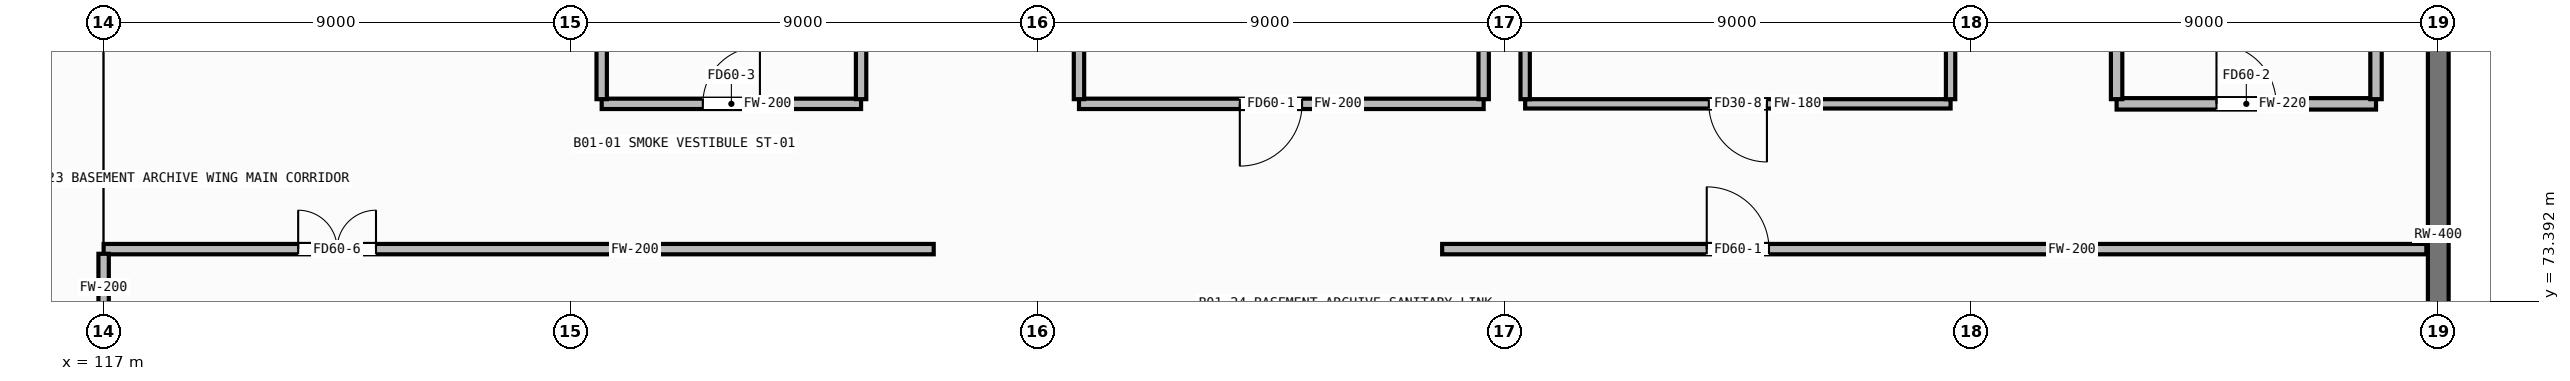
"""IFC4 building model, lengths in metres.
Left out: names, types, materials, properties, quantities, classifications, styles, units other than length and angle.
Written with IfcOpenShell. Run it as: python <this file> out.ifc"""

import sys

from ifc_helpers import new_model, si_unit, direction, frame, frame_2d, origin, place, context, subcontext, project, spatial, rectangle, extrude, element, fill, save


model = new_model("IFC4")
c1 = context("Model", 3, precision=1e-05, world=origin(), true_north=direction((0.0, 1.0)))
c2 = subcontext(c1, "Body", "Model", "MODEL_VIEW")
j1 = project(units=[si_unit("LENGTHUNIT", "METRE"), si_unit("PLANEANGLEUNIT", "RADIAN")], contexts=[c1])
p1 = place(None, origin())
s1 = spatial("IfcSite", under=j1, at=p1, CompositionType="ELEMENT")
p2 = place(p1, origin())
s2 = spatial("IfcBuilding", under=s1, at=p2, CompositionType="ELEMENT")
p3 = place(p2, frame((0.0, 0.0, -4.9)))
s3 = spatial("IfcBuildingStorey", under=s2, at=p3, CompositionType="ELEMENT", Elevation=-4.9)
p4 = place(p3, frame((162.0, 78.85, 0.0), z_axis=(0.0, 0.0, 1.0), x_axis=(0.0, -1.0, 0.0)))
e1 = element("IfcWall", 1, at=p4, inside=s3, PredefinedType="SOLIDWALL", context=c2, shape_type="SweptSolid", body=[
    extrude(rectangle(XDim=6.5, YDim=0.4, at=frame_2d((3.25, 0.0))), origin(), (0.0, 0.0, 1.0), 4.125),
])
p5 = place(p3, frame((126.6, 77.2, 0.0), z_axis=(0.0, 0.0, 1.0), x_axis=(1.0, 0.0, 0.0)))
e2 = element("IfcWall", 2, at=p5, inside=s3, PredefinedType="PARTITIONING", context=c2, shape_type="SweptSolid", body=[
    extrude(rectangle(XDim=5.0, YDim=0.2, at=frame_2d((2.5, 0.0))), origin(), (0.0, 0.0, 1.0), 4.625),
])
p6 = place(p5, frame((1.95, 0.0, 0.0)))
e3 = element("IfcOpeningElement", 3, at=p6, cuts=e2, PredefinedType="OPENING", context=c2, shape_type="SweptSolid", body=[
    extrude(rectangle(XDim=1.1, YDim=2.08, at=frame_2d((0.55, 1.04))), frame((0.0, 0.112, 0.0), z_axis=(0.0, -1.0, 0.0), x_axis=(1.0, 0.0, 0.0)), (0.0, 0.0, 1.0), 0.224),
])
for number, where, z_axis, x_axis in (
    (4, (126.6, 77.29, 0.0), (0.0, 0.0, 1.0), (0.0, 1.0, 0.0)),
    (5, (131.6, 77.29, 0.0), (0.0, 0.0, 1.0), (0.0, 1.0, 0.0)),
):
    element("IfcWall", number, at=place(p3, frame(where, z_axis=z_axis, x_axis=x_axis)), inside=s3, PredefinedType="PARTITIONING", context=c2, shape_type="SweptSolid", body=[
        extrude(rectangle(XDim=3.82, YDim=0.2, at=frame_2d((1.91, 0.0))), origin(), (0.0, 0.0, 1.0), 4.625),
    ])
p7 = place(p3, frame((155.8, 77.2, 0.0), z_axis=(0.0, 0.0, 1.0), x_axis=(1.0, 0.0, 0.0)))
e6 = element("IfcWall", 6, at=p7, inside=s3, PredefinedType="PARTITIONING", context=c2, shape_type="SweptSolid", body=[
    extrude(rectangle(XDim=5.0, YDim=0.22, at=frame_2d((2.5, 0.0))), origin(), (0.0, 0.0, 1.0), 4.625),
])
p8 = place(p7, frame((1.925, 0.0, 0.0)))
e7 = element("IfcOpeningElement", 7, at=p8, cuts=e6, PredefinedType="OPENING", context=c2, shape_type="SweptSolid", body=[
    extrude(rectangle(XDim=1.15, YDim=2.1, at=frame_2d((0.575, 1.05))), frame((0.0, 0.122, 0.0), z_axis=(0.0, -1.0, 0.0), x_axis=(1.0, 0.0, 0.0)), (0.0, 0.0, 1.0), 0.244),
])
for number, where, z_axis, x_axis in (
    (8, (155.8, 77.29, 0.0), (0.0, 0.0, 1.0), (0.0, 1.0, 0.0)),
    (9, (160.8, 77.29, 0.0), (0.0, 0.0, 1.0), (0.0, 1.0, 0.0)),
):
    element("IfcWall", number, at=place(p3, frame(where, z_axis=z_axis, x_axis=x_axis)), inside=s3, PredefinedType="PARTITIONING", context=c2, shape_type="SweptSolid", body=[
        extrude(rectangle(XDim=3.82, YDim=0.22, at=frame_2d((1.91, 0.0))), origin(), (0.0, 0.0, 1.0), 4.625),
    ])
p9 = place(p3, frame((135.8, 77.2, 0.0), z_axis=(0.0, 0.0, 1.0), x_axis=(1.0, 0.0, 0.0)))
e10 = element("IfcWall", 10, at=p9, inside=s3, PredefinedType="PARTITIONING", context=c2, shape_type="SweptSolid", body=[
    extrude(rectangle(XDim=7.8, YDim=0.2, at=frame_2d((3.9, 0.0))), origin(), (0.0, 0.0, 1.0), 4.625),
])
p10 = place(p9, frame((3.1, 0.0, 0.0)))
e11 = element("IfcOpeningElement", 11, at=p10, cuts=e10, PredefinedType="OPENING", context=c2, shape_type="SweptSolid", body=[
    extrude(rectangle(XDim=1.2, YDim=2.1, at=frame_2d((0.6, 1.05))), frame((0.0, 0.112, 0.0), z_axis=(0.0, -1.0, 0.0), x_axis=(1.0, 0.0, 0.0)), (0.0, 0.0, 1.0), 0.224),
])
for number, where, z_axis, x_axis in (
    (12, (135.8, 77.29, 0.0), (0.0, 0.0, 1.0), (0.0, 1.0, 0.0)),
    (13, (143.6, 77.29, 0.0), (0.0, 0.0, 1.0), (0.0, 1.0, 0.0)),
):
    element("IfcWall", number, at=place(p3, frame(where, z_axis=z_axis, x_axis=x_axis)), inside=s3, PredefinedType="PARTITIONING", context=c2, shape_type="SweptSolid", body=[
        extrude(rectangle(XDim=3.82, YDim=0.2, at=frame_2d((1.91, 0.0))), origin(), (0.0, 0.0, 1.0), 4.625),
    ])
p11 = place(p3, frame((144.4, 77.2, 0.0), z_axis=(0.0, 0.0, 1.0), x_axis=(1.0, 0.0, 0.0)))
e14 = element("IfcWall", 14, at=p11, inside=s3, PredefinedType="PARTITIONING", context=c2, shape_type="SweptSolid", body=[
    extrude(rectangle(XDim=8.2, YDim=0.18, at=frame_2d((4.1, 0.0))), origin(), (0.0, 0.0, 1.0), 4.625),
])
p12 = place(p11, frame((3.54, 0.0, 0.0)))
e15 = element("IfcOpeningElement", 15, at=p12, cuts=e14, PredefinedType="OPENING", context=c2, shape_type="SweptSolid", body=[
    extrude(rectangle(XDim=1.12, YDim=2.08, at=frame_2d((0.56, 1.04))), frame((0.0, 0.102, 0.0), z_axis=(0.0, -1.0, 0.0), x_axis=(1.0, 0.0, 0.0)), (0.0, 0.0, 1.0), 0.204),
])
for number, where, z_axis, x_axis in (
    (16, (144.4, 77.29, 0.0), (0.0, 0.0, 1.0), (0.0, 1.0, 0.0)),
    (17, (152.6, 77.29, 0.0), (0.0, 0.0, 1.0), (0.0, 1.0, 0.0)),
):
    element("IfcWall", number, at=place(p3, frame(where, z_axis=z_axis, x_axis=x_axis)), inside=s3, PredefinedType="PARTITIONING", context=c2, shape_type="SweptSolid", body=[
        extrude(rectangle(XDim=3.82, YDim=0.18, at=frame_2d((1.91, 0.0))), origin(), (0.0, 0.0, 1.0), 4.625),
    ])
p13 = place(p3, frame((117.0, 74.4, 0.0), z_axis=(0.0, 0.0, 1.0), x_axis=(1.0, 0.0, 0.0)))
e18 = element("IfcWall", 18, at=p13, inside=s3, PredefinedType="PARTITIONING", context=c2, shape_type="SweptSolid", body=[
    extrude(rectangle(XDim=16.0, YDim=0.2, at=frame_2d((8.0, 0.0))), origin(), (0.0, 0.0, 1.0), 4.625),
])
p14 = place(p13, frame((3.75, 0.0, 0.0)))
e19 = element("IfcOpeningElement", 19, at=p14, cuts=e18, PredefinedType="OPENING", context=c2, shape_type="SweptSolid", body=[
    extrude(rectangle(XDim=1.5, YDim=2.1, at=frame_2d((0.75, 1.05))), frame((0.0, 0.112, 0.0), z_axis=(0.0, -1.0, 0.0), x_axis=(1.0, 0.0, 0.0)), (0.0, 0.0, 1.0), 0.224),
])
p15 = place(p3, frame((117.0, 72.52, 0.0), z_axis=(0.0, 0.0, 1.0), x_axis=(0.0, 1.0, 0.0)))
e20 = element("IfcWall", 20, at=p15, inside=s3, PredefinedType="PARTITIONING", context=c2, shape_type="SweptSolid", body=[
    extrude(rectangle(XDim=1.79, YDim=0.2, at=frame_2d((0.895, 0.0))), origin(), (0.0, 0.0, 1.0), 3.905),
])
p16 = place(p3, frame((142.8, 74.4, 0.0), z_axis=(0.0, 0.0, 1.0), x_axis=(1.0, 0.0, 0.0)))
e21 = element("IfcWall", 21, at=p16, inside=s3, PredefinedType="PARTITIONING", context=c2, shape_type="SweptSolid", body=[
    extrude(rectangle(XDim=18.97, YDim=0.2, at=frame_2d((9.485, 0.0))), origin(), (0.0, 0.0, 1.0), 4.625),
])
p17 = place(p16, frame((5.1, 0.0, 0.0)))
e22 = element("IfcOpeningElement", 22, at=p17, cuts=e21, PredefinedType="OPENING", context=c2, shape_type="SweptSolid", body=[
    extrude(rectangle(XDim=1.2, YDim=2.1, at=frame_2d((0.6, 1.05))), frame((0.0, 0.112, 0.0), z_axis=(0.0, -1.0, 0.0), x_axis=(1.0, 0.0, 0.0)), (0.0, 0.0, 1.0), 0.224),
])
p18 = place(p6, origin())
e23 = element("IfcDoor", 23, at=p18, inside=s3, OperationType="SINGLE_SWING_RIGHT", PredefinedType="DOOR", context=c2, shape_type="SweptSolid", body=[
    extrude(rectangle(XDim=1.1, YDim=2.08, at=frame_2d((0.55, 1.04))), frame((0.0, 0.025, 0.0), z_axis=(0.0, -1.0, 0.0), x_axis=(1.0, 0.0, 0.0)), (0.0, 0.0, 1.0), 0.05),
])
fill(e3, e23)
p19 = place(p8, origin())
e24 = element("IfcDoor", 24, at=p19, inside=s3, OperationType="SINGLE_SWING_LEFT", PredefinedType="DOOR", context=c2, shape_type="SweptSolid", body=[
    extrude(rectangle(XDim=1.15, YDim=2.1, at=frame_2d((0.575, 1.05))), frame((0.0, 0.025, 0.0), z_axis=(0.0, -1.0, 0.0), x_axis=(1.0, 0.0, 0.0)), (0.0, 0.0, 1.0), 0.05),
])
fill(e7, e24)
p20 = place(p10, frame((1.2, 0.0, 0.0), z_axis=(0.0, 0.0, 1.0), x_axis=(-1.0, 0.0, 0.0)))
e25 = element("IfcDoor", 25, at=p20, inside=s3, OperationType="SINGLE_SWING_RIGHT", PredefinedType="DOOR", context=c2, shape_type="SweptSolid", body=[
    extrude(rectangle(XDim=1.2, YDim=2.1, at=frame_2d((0.6, 1.05))), frame((0.0, 0.025, 0.0), z_axis=(0.0, -1.0, 0.0), x_axis=(1.0, 0.0, 0.0)), (0.0, 0.0, 1.0), 0.05),
])
fill(e11, e25)
p21 = place(p12, frame((1.12, 0.0, 0.0), z_axis=(0.0, 0.0, 1.0), x_axis=(-1.0, 0.0, 0.0)))
e26 = element("IfcDoor", 26, at=p21, inside=s3, OperationType="SINGLE_SWING_LEFT", PredefinedType="DOOR", context=c2, shape_type="SweptSolid", body=[
    extrude(rectangle(XDim=1.12, YDim=2.08, at=frame_2d((0.56, 1.04))), frame((0.0, 0.025, 0.0), z_axis=(0.0, -1.0, 0.0), x_axis=(1.0, 0.0, 0.0)), (0.0, 0.0, 1.0), 0.05),
])
fill(e15, e26)
p22 = place(p14, origin())
e27 = element("IfcDoor", 27, at=p22, inside=s3, OperationType="DOUBLE_DOOR_SINGLE_SWING", PredefinedType="DOOR", context=c2, shape_type="SweptSolid", body=[
    extrude(rectangle(XDim=1.5, YDim=2.1, at=frame_2d((0.75, 1.05))), frame((0.0, 0.025, 0.0), z_axis=(0.0, -1.0, 0.0), x_axis=(1.0, 0.0, 0.0)), (0.0, 0.0, 1.0), 0.05),
])
fill(e19, e27)
p23 = place(p17, origin())
e28 = element("IfcDoor", 28, at=p23, inside=s3, OperationType="SINGLE_SWING_LEFT", PredefinedType="DOOR", context=c2, shape_type="SweptSolid", body=[
    extrude(rectangle(XDim=1.2, YDim=2.1, at=frame_2d((0.6, 1.05))), frame((0.0, 0.025, 0.0), z_axis=(0.0, -1.0, 0.0), x_axis=(1.0, 0.0, 0.0)), (0.0, 0.0, 1.0), 0.05),
])
fill(e22, e28)
save(model, sys.argv[1])
